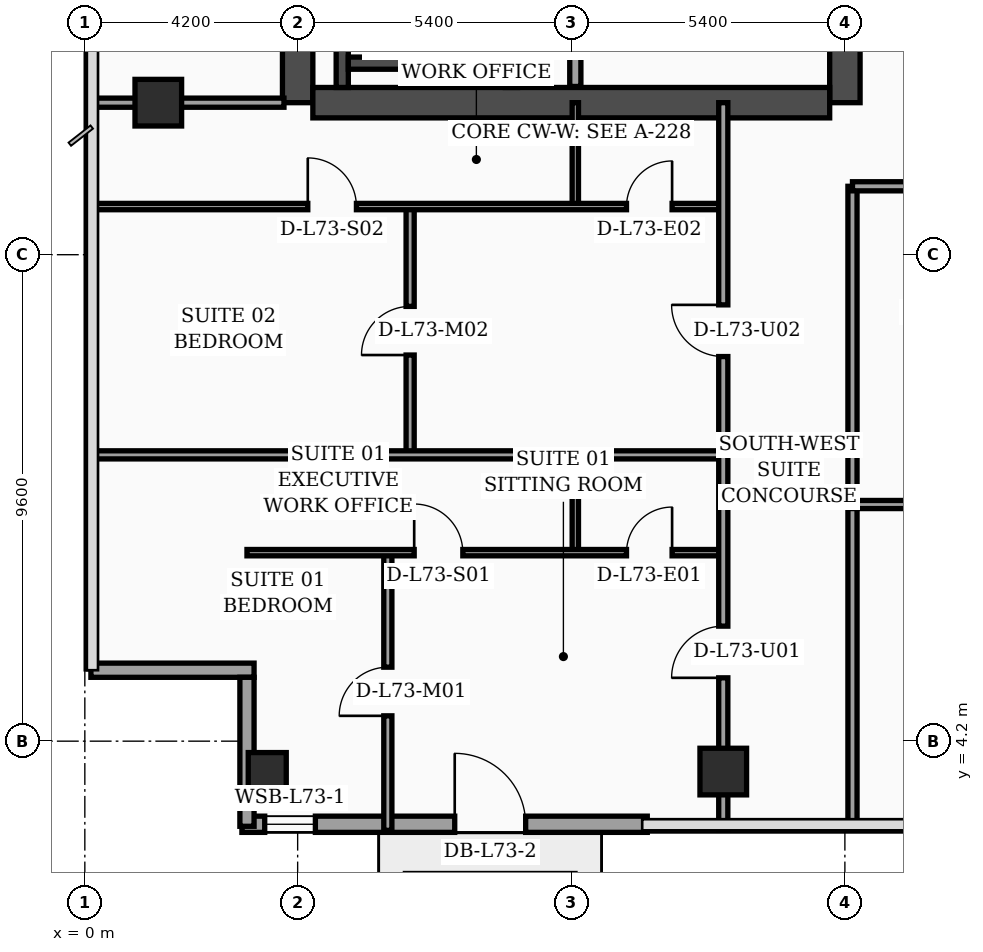
"""IFC4 building model, lengths in metres.
Left out: names, types, materials, properties, quantities, classifications, styles, units other than length and angle.
Written with IfcOpenShell. Run it as: python <this file> out.ifc"""

import sys

from ifc_helpers import new_model, si_unit, direction, frame, frame_2d, origin, origin_2d, place, context, subcontext, project, spatial, rectangle, hollow_rectangle, extrude, element, fill, save


model = new_model("IFC4")
c1 = context("Model", 3, precision=1e-05, world=origin(), true_north=direction((0.0, 1.0)))
c2 = subcontext(c1, "Body", "Model", "MODEL_VIEW")
j1 = project(units=[si_unit("LENGTHUNIT", "METRE"), si_unit("PLANEANGLEUNIT", "RADIAN")], contexts=[c1])
p1 = place(None, origin())
s1 = spatial("IfcSite", under=j1, at=p1, CompositionType="ELEMENT")
p2 = place(p1, origin())
s2 = spatial("IfcBuilding", under=s1, at=p2, CompositionType="ELEMENT")
p3 = place(p2, frame((0.0, 0.0, 294.9)))
s3 = spatial("IfcBuildingStorey", under=s2, at=p3, CompositionType="ELEMENT", Elevation=294.9)
p4 = place(p3, frame((4.2, 16.8, 0.0), z_axis=(0.0, 0.0, 1.0), x_axis=(0.0, 1.0, 0.0)))
e1 = element("IfcWall", 1, at=p4, inside=s3, PredefinedType="SHEAR", context=c2, shape_type="SweptSolid", body=[
    extrude(rectangle(XDim=21.6, YDim=0.6, at=frame_2d((10.8, 0.0))), origin(), (0.0, 0.0, 1.0), 3.56),
])
p5 = place(p3, frame((15.0, 16.8, 0.0), z_axis=(0.0, 0.0, 1.0), x_axis=(0.0, 1.0, 0.0)))
e2 = element("IfcWall", 2, at=p5, inside=s3, PredefinedType="SHEAR", context=c2, shape_type="SweptSolid", body=[
    extrude(rectangle(XDim=21.6, YDim=0.6, at=frame_2d((10.8, 0.0))), origin(), (0.0, 0.0, 1.0), 3.56),
])
p6 = place(p5, frame((8.65, 0.0, 0.0)))
e3 = element("IfcOpeningElement", 3, at=p6, cuts=e2, PredefinedType="OPENING", context=c2, shape_type="SweptSolid", body=[
    extrude(rectangle(XDim=1.1, YDim=2.2, at=frame_2d((0.55, 1.1))), frame((0.0, 0.31, 0.0), z_axis=(0.0, -1.0, 0.0), x_axis=(1.0, 0.0, 0.0)), (0.0, 0.0, 1.0), 0.62),
])
p7 = place(p5, frame((18.9, 0.0, 0.0)))
e4 = element("IfcOpeningElement", 4, at=p7, cuts=e2, PredefinedType="OPENING", context=c2, shape_type="SweptSolid", body=[
    extrude(rectangle(XDim=1.1, YDim=2.2, at=frame_2d((0.55, 1.1))), frame((0.0, 0.31, 0.0), z_axis=(0.0, -1.0, 0.0), x_axis=(1.0, 0.0, 0.0)), (0.0, 0.0, 1.0), 0.62),
])
p8 = place(p3, frame((4.5, 16.8, 0.0), z_axis=(0.0, 0.0, 1.0), x_axis=(1.0, 0.0, 0.0)))
e5 = element("IfcWall", 5, at=p8, inside=s3, PredefinedType="SHEAR", context=c2, shape_type="SweptSolid", body=[
    extrude(rectangle(XDim=10.2, YDim=0.6, at=frame_2d((5.1, 0.0))), origin(), (0.0, 0.0, 1.0), 3.56),
])
p9 = place(p3, frame((5.08, 17.1, 0.0), z_axis=(0.0, 0.0, 1.0), x_axis=(0.0, 1.0, 0.0)))
e6 = element("IfcWall", 6, at=p9, inside=s3, PredefinedType="SOLIDWALL", context=c2, shape_type="SweptSolid", body=[
    extrude(rectangle(XDim=9.69, YDim=0.24, at=frame_2d((4.845, 0.0))), origin(), (0.0, 0.0, 1.0), 3.56),
])
p10 = place(p3, frame((8.42, 17.1, 0.0), z_axis=(0.0, 0.0, 1.0), x_axis=(0.0, 1.0, 0.0)))
e7 = element("IfcWall", 7, at=p10, inside=s3, PredefinedType="SOLIDWALL", context=c2, shape_type="SweptSolid", body=[
    extrude(rectangle(XDim=9.69, YDim=0.24, at=frame_2d((4.845, 0.0))), origin(), (0.0, 0.0, 1.0), 3.56),
])
p11 = place(p10, frame((0.35, 0.0, 0.0)))
e8 = element("IfcOpeningElement", 8, at=p11, cuts=e7, PredefinedType="OPENING", context=c2, shape_type="SweptSolid", body=[
    extrude(rectangle(XDim=1.15, YDim=2.2, at=frame_2d((0.575, 1.1))), frame((0.0, 0.13, 0.0), z_axis=(0.0, -1.0, 0.0), x_axis=(1.0, 0.0, 0.0)), (0.0, 0.0, 1.0), 0.26),
])
p12 = place(p3, frame((5.2, 17.58, 0.0), z_axis=(0.0, 0.0, 1.0), x_axis=(1.0, 0.0, 0.0)))
e9 = element("IfcWall", 9, at=p12, inside=s3, PredefinedType="SOLIDWALL", context=c2, shape_type="SweptSolid", body=[
    extrude(rectangle(XDim=3.1, YDim=0.24, at=frame_2d((1.55, 0.0))), origin(), (0.0, 0.0, 1.0), 3.56),
])
p13 = place(p3, frame((3.6, 3.6, 0.0), z_axis=(0.0, 0.0, 1.0), x_axis=(1.0, 0.0, 0.0)))
e10 = element("IfcColumn", 10, at=p13, inside=s3, PredefinedType="COLUMN", context=c2, shape_type="SweptSolid", body=[
    extrude(hollow_rectangle(XDim=0.75, YDim=0.75, WallThickness=0.032, at=origin_2d()), origin(), (0.0, 0.0, 1.0), 3.56),
])
for number, where, z_axis, x_axis in (
    (11, (1.45, 16.8, 0.0), (0.0, 0.0, 1.0), (1.0, 0.0, 0.0)),
    (12, (12.6, 3.6, 0.0), (0.0, 0.0, 1.0), (1.0, 0.0, 0.0)),
):
    element("IfcColumn", number, at=place(p3, frame(where, z_axis=z_axis, x_axis=x_axis)), inside=s3, PredefinedType="COLUMN", context=c2, shape_type="SweptSolid", body=[
        extrude(rectangle(XDim=0.92, YDim=0.92, at=origin_2d()), origin(), (0.0, 0.0, 1.0), 3.56),
    ])
p14 = place(p3, frame((3.1, 2.56, 0.0), z_axis=(0.0, 0.0, 1.0), x_axis=(1.0, 0.0, 0.0)))
e13 = element("IfcWall", 13, at=p14, inside=s3, PredefinedType="SOLIDWALL", context=c2, shape_type="SweptSolid", body=[
    extrude(rectangle(XDim=8.0, YDim=0.32, at=frame_2d((4.0, 0.0))), origin(), (0.0, 0.0, 1.0), 3.56),
])
p15 = place(p14, frame((0.45, 0.0, 0.75)))
e14 = element("IfcOpeningElement", 14, at=p15, cuts=e13, PredefinedType="OPENING", context=c2, shape_type="SweptSolid", body=[
    extrude(rectangle(XDim=1.0, YDim=1.6, at=frame_2d((0.5, 0.8))), frame((0.0, 0.17, 0.0), z_axis=(0.0, -1.0, 0.0), x_axis=(1.0, 0.0, 0.0)), (0.0, 0.0, 1.0), 0.34),
])
p16 = place(p14, frame((4.2, 0.0, 0.0)))
e15 = element("IfcOpeningElement", 15, at=p16, cuts=e13, PredefinedType="OPENING", context=c2, shape_type="SweptSolid", body=[
    extrude(rectangle(XDim=1.4, YDim=2.25, at=frame_2d((0.7, 1.125))), frame((0.0, 0.17, 0.0), z_axis=(0.0, -1.0, 0.0), x_axis=(1.0, 0.0, 0.0)), (0.0, 0.0, 1.0), 0.34),
])
p17 = place(p3, frame((0.12, 5.6, 0.0), z_axis=(0.0, 0.0, 1.0), x_axis=(1.0, 0.0, 0.0)))
e16 = element("IfcWall", 16, at=p17, inside=s3, PredefinedType="SOLIDWALL", context=c2, shape_type="SweptSolid", body=[
    extrude(rectangle(XDim=3.22, YDim=0.28, at=frame_2d((1.61, 0.0))), origin(), (0.0, 0.0, 1.0), 2.99),
])
p18 = place(p3, frame((3.2, 5.46, 0.0), z_axis=(0.0, 0.0, 1.0), x_axis=(0.0, -1.0, 0.0)))
e17 = element("IfcWall", 17, at=p18, inside=s3, PredefinedType="SOLIDWALL", context=c2, shape_type="SweptSolid", body=[
    extrude(rectangle(XDim=2.94, YDim=0.28, at=frame_2d((1.47, 0.0))), origin(), (0.0, 0.0, 1.0), 2.99),
])
p19 = place(p3, frame((9.68, 17.12, 0.0), z_axis=(0.0, 0.0, 1.0), x_axis=(0.0, 1.0, 0.0)))
e18 = element("IfcWall", 18, at=p19, inside=s3, PredefinedType="SOLIDWALL", context=c2, shape_type="SweptSolid", body=[
    extrude(rectangle(XDim=7.88, YDim=0.22, at=frame_2d((3.94, 0.0))), origin(), (0.0, 0.0, 1.0), 3.56),
])
p20 = place(p3, frame((0.08, 16.8, 0.0), z_axis=(0.0, 0.0, 1.0), x_axis=(1.0, 0.0, 0.0)))
e19 = element("IfcWall", 19, at=p20, inside=s3, PredefinedType="PARTITIONING", context=c2, shape_type="SweptSolid", body=[
    extrude(rectangle(XDim=3.85, YDim=0.18, at=frame_2d((1.925, 0.0))), origin(), (0.0, 0.0, 1.0), 2.99),
])
p21 = place(p3, frame((9.68, 7.92, 0.0), z_axis=(0.0, 0.0, 1.0), x_axis=(0.0, 1.0, 0.0)))
e20 = element("IfcWall", 20, at=p21, inside=s3, PredefinedType="PARTITIONING", context=c2, shape_type="SweptSolid", body=[
    extrude(rectangle(XDim=1.93, YDim=0.125, at=frame_2d((0.965, 0.0))), origin(), (0.0, 0.0, 1.0), 3.09),
])
p22 = place(p3, frame((5.98, 2.44, 0.0), z_axis=(0.0, 0.0, 1.0), x_axis=(0.0, 1.0, 0.0)))
e21 = element("IfcWall", 21, at=p22, inside=s3, PredefinedType="PARTITIONING", context=c2, shape_type="SweptSolid", body=[
    extrude(rectangle(XDim=5.48, YDim=0.16, at=frame_2d((2.74, 0.0))), origin(), (0.0, 0.0, 1.0), 3.09),
])
p23 = place(p22, frame((2.26, 0.0, 0.0)))
e22 = element("IfcOpeningElement", 22, at=p23, cuts=e21, PredefinedType="OPENING", context=c2, shape_type="SweptSolid", body=[
    extrude(rectangle(XDim=0.96, YDim=2.2, at=frame_2d((0.48, 1.1))), frame((0.0, 0.09, 0.0), z_axis=(0.0, -1.0, 0.0), x_axis=(1.0, 0.0, 0.0)), (0.0, 0.0, 1.0), 0.18),
])
p24 = place(p3, frame((3.2, 7.92, 0.0), z_axis=(0.0, 0.0, 1.0), x_axis=(1.0, 0.0, 0.0)))
e23 = element("IfcWall", 23, at=p24, inside=s3, PredefinedType="PARTITIONING", context=c2, shape_type="SweptSolid", body=[
    extrude(rectangle(XDim=9.4, YDim=0.125, at=frame_2d((4.7, 0.0))), origin(), (0.0, 0.0, 1.0), 2.99),
])
p25 = place(p24, frame((3.3, 0.0, 0.0)))
e24 = element("IfcOpeningElement", 24, at=p25, cuts=e23, PredefinedType="OPENING", context=c2, shape_type="SweptSolid", body=[
    extrude(rectangle(XDim=0.96, YDim=2.2, at=frame_2d((0.48, 1.1))), frame((0.0, 0.073, 0.0), z_axis=(0.0, -1.0, 0.0), x_axis=(1.0, 0.0, 0.0)), (0.0, 0.0, 1.0), 0.145),
])
p26 = place(p24, frame((7.49, 0.0, 0.0)))
e25 = element("IfcOpeningElement", 25, at=p26, cuts=e23, PredefinedType="OPENING", context=c2, shape_type="SweptSolid", body=[
    extrude(rectangle(XDim=0.9, YDim=2.15, at=frame_2d((0.45, 1.075))), frame((0.0, 0.073, 0.0), z_axis=(0.0, -1.0, 0.0), x_axis=(1.0, 0.0, 0.0)), (0.0, 0.0, 1.0), 0.145),
])
p27 = place(p3, frame((9.68, 14.75, 0.0), z_axis=(0.0, 0.0, 1.0), x_axis=(0.0, 1.0, 0.0)))
e26 = element("IfcWall", 26, at=p27, inside=s3, PredefinedType="PARTITIONING", context=c2, shape_type="SweptSolid", body=[
    extrude(rectangle(XDim=2.05, YDim=0.125, at=frame_2d((1.025, 0.0))), origin(), (0.0, 0.0, 1.0), 3.56),
])
p28 = place(p3, frame((6.42, 9.85, 0.0), z_axis=(0.0, 0.0, 1.0), x_axis=(0.0, 1.0, 0.0)))
e27 = element("IfcWall", 27, at=p28, inside=s3, PredefinedType="PARTITIONING", context=c2, shape_type="SweptSolid", body=[
    extrude(rectangle(XDim=4.9, YDim=0.16, at=frame_2d((2.45, 0.0))), origin(), (0.0, 0.0, 1.0), 3.14),
])
p29 = place(p28, frame((1.97, 0.0, 0.0)))
e28 = element("IfcOpeningElement", 28, at=p29, cuts=e27, PredefinedType="OPENING", context=c2, shape_type="SweptSolid", body=[
    extrude(rectangle(XDim=0.96, YDim=2.2, at=frame_2d((0.48, 1.1))), frame((0.0, 0.09, 0.0), z_axis=(0.0, -1.0, 0.0), x_axis=(1.0, 0.0, 0.0)), (0.0, 0.0, 1.0), 0.18),
])
p30 = place(p3, frame((0.08, 14.75, 0.0), z_axis=(0.0, 0.0, 1.0), x_axis=(1.0, 0.0, 0.0)))
e29 = element("IfcWall", 29, at=p30, inside=s3, PredefinedType="PARTITIONING", context=c2, shape_type="SweptSolid", body=[
    extrude(rectangle(XDim=12.52, YDim=0.125, at=frame_2d((6.26, 0.0))), origin(), (0.0, 0.0, 1.0), 2.99),
])
p31 = place(p30, frame((4.32, 0.0, 0.0)))
e30 = element("IfcOpeningElement", 30, at=p31, cuts=e29, PredefinedType="OPENING", context=c2, shape_type="SweptSolid", body=[
    extrude(rectangle(XDim=0.96, YDim=2.2, at=frame_2d((0.48, 1.1))), frame((0.0, 0.073, 0.0), z_axis=(0.0, -1.0, 0.0), x_axis=(1.0, 0.0, 0.0)), (0.0, 0.0, 1.0), 0.145),
])
p32 = place(p30, frame((10.61, 0.0, 0.0)))
e31 = element("IfcOpeningElement", 31, at=p32, cuts=e29, PredefinedType="OPENING", context=c2, shape_type="SweptSolid", body=[
    extrude(rectangle(XDim=0.9, YDim=2.15, at=frame_2d((0.45, 1.075))), frame((0.0, 0.073, 0.0), z_axis=(0.0, -1.0, 0.0), x_axis=(1.0, 0.0, 0.0)), (0.0, 0.0, 1.0), 0.145),
])
p33 = place(p3, frame((0.08, 9.85, 0.0), z_axis=(0.0, 0.0, 1.0), x_axis=(1.0, 0.0, 0.0)))
e32 = element("IfcWall", 32, at=p33, inside=s3, PredefinedType="PARTITIONING", context=c2, shape_type="SweptSolid", body=[
    extrude(rectangle(XDim=12.52, YDim=0.16, at=frame_2d((6.26, 0.0))), origin(), (0.0, 0.0, 1.0), 2.99),
])
p34 = place(p3, frame((12.6, 2.44, 0.0), z_axis=(0.0, 0.0, 1.0), x_axis=(0.0, 1.0, 0.0)))
e33 = element("IfcWall", 33, at=p34, inside=s3, PredefinedType="PARTITIONING", context=c2, shape_type="SweptSolid", body=[
    extrude(rectangle(XDim=14.36, YDim=0.18, at=frame_2d((7.18, 0.0))), origin(), (0.0, 0.0, 1.0), 2.99),
])
p35 = place(p34, frame((3.01, 0.0, 0.0)))
e34 = element("IfcOpeningElement", 34, at=p35, cuts=e33, PredefinedType="OPENING", context=c2, shape_type="SweptSolid", body=[
    extrude(rectangle(XDim=1.02, YDim=2.2, at=frame_2d((0.51, 1.1))), frame((0.0, 0.1, 0.0), z_axis=(0.0, -1.0, 0.0), x_axis=(1.0, 0.0, 0.0)), (0.0, 0.0, 1.0), 0.2),
])
p36 = place(p34, frame((9.35, 0.0, 0.0)))
e35 = element("IfcOpeningElement", 35, at=p36, cuts=e33, PredefinedType="OPENING", context=c2, shape_type="SweptSolid", body=[
    extrude(rectangle(XDim=1.02, YDim=2.2, at=frame_2d((0.51, 1.1))), frame((0.0, 0.1, 0.0), z_axis=(0.0, -1.0, 0.0), x_axis=(1.0, 0.0, 0.0)), (0.0, 0.0, 1.0), 0.2),
])
p37 = place(p3, frame((15.15, 2.44, 0.0), z_axis=(0.0, 0.0, 1.0), x_axis=(0.0, 1.0, 0.0)))
e36 = element("IfcWall", 36, at=p37, inside=s3, PredefinedType="PARTITIONING", context=c2, shape_type="SweptSolid", body=[
    extrude(rectangle(XDim=12.71, YDim=0.18, at=frame_2d((6.355, 0.0))), origin(), (0.0, 0.0, 1.0), 3.09),
])
p38 = place(p3, frame((15.15, 8.87, 0.0), z_axis=(0.0, 0.0, 1.0), x_axis=(1.0, 0.0, 0.0)))
e37 = element("IfcWall", 37, at=p38, inside=s3, PredefinedType="PARTITIONING", context=c2, shape_type="SweptSolid", body=[
    extrude(rectangle(XDim=4.45, YDim=0.16, at=frame_2d((2.225, 0.0))), origin(), (0.0, 0.0, 1.0), 3.56),
])
p39 = place(p38, frame((1.75, 0.0, 0.0)))
e38 = element("IfcOpeningElement", 38, at=p39, cuts=e37, PredefinedType="OPENING", context=c2, shape_type="SweptSolid", body=[
    extrude(rectangle(XDim=0.96, YDim=2.2, at=frame_2d((0.48, 1.1))), frame((0.0, 0.09, 0.0), z_axis=(0.0, -1.0, 0.0), x_axis=(1.0, 0.0, 0.0)), (0.0, 0.0, 1.0), 0.18),
])
p40 = place(p3, frame((15.15, 15.15, 0.0), z_axis=(0.0, 0.0, 1.0), x_axis=(1.0, 0.0, 0.0)))
e39 = element("IfcWall", 39, at=p40, inside=s3, PredefinedType="PARTITIONING", context=c2, shape_type="SweptSolid", body=[
    extrude(rectangle(XDim=6.45, YDim=0.18, at=frame_2d((3.225, 0.0))), origin(), (0.0, 0.0, 1.0), 2.59),
])
p41 = place(p40, frame((1.74, 0.0, 0.0)))
e40 = element("IfcOpeningElement", 40, at=p41, cuts=e39, PredefinedType="OPENING", context=c2, shape_type="SweptSolid", body=[
    extrude(rectangle(XDim=1.02, YDim=2.2, at=frame_2d((0.51, 1.1))), frame((0.0, 0.1, 0.0), z_axis=(0.0, -1.0, 0.0), x_axis=(1.0, 0.0, 0.0)), (0.0, 0.0, 1.0), 0.2),
])
p42 = place(p15, origin())
e41 = element("IfcWindow", 41, at=p42, inside=s3, PartitioningType="SINGLE_PANEL", PredefinedType="WINDOW", context=c2, shape_type="SweptSolid", body=[
    extrude(rectangle(XDim=1.0, YDim=1.6, at=frame_2d((0.5, 0.8))), frame((0.0, 0.03, 0.0), z_axis=(0.0, -1.0, 0.0), x_axis=(1.0, 0.0, 0.0)), (0.0, 0.0, 1.0), 0.06),
])
fill(e14, e41)
p43 = place(p16, origin())
e42 = element("IfcDoor", 42, at=p43, inside=s3, OperationType="SINGLE_SWING_LEFT", PredefinedType="DOOR", context=c2, shape_type="SweptSolid", body=[
    extrude(rectangle(XDim=1.4, YDim=2.25, at=frame_2d((0.7, 1.125))), frame((0.0, 0.025, 0.0), z_axis=(0.0, -1.0, 0.0), x_axis=(1.0, 0.0, 0.0)), (0.0, 0.0, 1.0), 0.05),
])
fill(e15, e42)
p44 = place(p23, origin())
e43 = element("IfcDoor", 43, at=p44, inside=s3, OperationType="SINGLE_SWING_LEFT", PredefinedType="DOOR", context=c2, shape_type="SweptSolid", body=[
    extrude(rectangle(XDim=0.96, YDim=2.2, at=frame_2d((0.48, 1.1))), frame((0.0, 0.025, 0.0), z_axis=(0.0, -1.0, 0.0), x_axis=(1.0, 0.0, 0.0)), (0.0, 0.0, 1.0), 0.05),
])
fill(e22, e43)
p45 = place(p25, origin())
e44 = element("IfcDoor", 44, at=p45, inside=s3, OperationType="SINGLE_SWING_LEFT", PredefinedType="DOOR", context=c2, shape_type="SweptSolid", body=[
    extrude(rectangle(XDim=0.96, YDim=2.2, at=frame_2d((0.48, 1.1))), frame((0.0, 0.025, 0.0), z_axis=(0.0, -1.0, 0.0), x_axis=(1.0, 0.0, 0.0)), (0.0, 0.0, 1.0), 0.05),
])
fill(e24, e44)
p46 = place(p26, origin())
e45 = element("IfcDoor", 45, at=p46, inside=s3, OperationType="SINGLE_SWING_RIGHT", PredefinedType="DOOR", context=c2, shape_type="SweptSolid", body=[
    extrude(rectangle(XDim=0.9, YDim=2.15, at=frame_2d((0.45, 1.075))), frame((0.0, 0.025, 0.0), z_axis=(0.0, -1.0, 0.0), x_axis=(1.0, 0.0, 0.0)), (0.0, 0.0, 1.0), 0.05),
])
fill(e25, e45)
p47 = place(p29, origin())
e46 = element("IfcDoor", 46, at=p47, inside=s3, OperationType="SINGLE_SWING_LEFT", PredefinedType="DOOR", context=c2, shape_type="SweptSolid", body=[
    extrude(rectangle(XDim=0.96, YDim=2.2, at=frame_2d((0.48, 1.1))), frame((0.0, 0.025, 0.0), z_axis=(0.0, -1.0, 0.0), x_axis=(1.0, 0.0, 0.0)), (0.0, 0.0, 1.0), 0.05),
])
fill(e28, e46)
p48 = place(p31, origin())
e47 = element("IfcDoor", 47, at=p48, inside=s3, OperationType="SINGLE_SWING_LEFT", PredefinedType="DOOR", context=c2, shape_type="SweptSolid", body=[
    extrude(rectangle(XDim=0.96, YDim=2.2, at=frame_2d((0.48, 1.1))), frame((0.0, 0.025, 0.0), z_axis=(0.0, -1.0, 0.0), x_axis=(1.0, 0.0, 0.0)), (0.0, 0.0, 1.0), 0.05),
])
fill(e30, e47)
p49 = place(p32, origin())
e48 = element("IfcDoor", 48, at=p49, inside=s3, OperationType="SINGLE_SWING_RIGHT", PredefinedType="DOOR", context=c2, shape_type="SweptSolid", body=[
    extrude(rectangle(XDim=0.9, YDim=2.15, at=frame_2d((0.45, 1.075))), frame((0.0, 0.025, 0.0), z_axis=(0.0, -1.0, 0.0), x_axis=(1.0, 0.0, 0.0)), (0.0, 0.0, 1.0), 0.05),
])
fill(e31, e48)
p50 = place(p35, origin())
e49 = element("IfcDoor", 49, at=p50, inside=s3, OperationType="SINGLE_SWING_LEFT", PredefinedType="DOOR", context=c2, shape_type="SweptSolid", body=[
    extrude(rectangle(XDim=1.02, YDim=2.2, at=frame_2d((0.51, 1.1))), frame((0.0, 0.025, 0.0), z_axis=(0.0, -1.0, 0.0), x_axis=(1.0, 0.0, 0.0)), (0.0, 0.0, 1.0), 0.05),
])
fill(e34, e49)
p51 = place(p36, origin())
e50 = element("IfcDoor", 50, at=p51, inside=s3, OperationType="SINGLE_SWING_RIGHT", PredefinedType="DOOR", context=c2, shape_type="SweptSolid", body=[
    extrude(rectangle(XDim=1.02, YDim=2.2, at=frame_2d((0.51, 1.1))), frame((0.0, 0.025, 0.0), z_axis=(0.0, -1.0, 0.0), x_axis=(1.0, 0.0, 0.0)), (0.0, 0.0, 1.0), 0.05),
])
fill(e35, e50)
p52 = place(p11, origin())
e51 = element("IfcDoor", 51, at=p52, inside=s3, OperationType="SINGLE_SWING_LEFT", PredefinedType="DOOR", context=c2, shape_type="SweptSolid", body=[
    extrude(rectangle(XDim=1.15, YDim=2.2, at=frame_2d((0.575, 1.1))), frame((0.0, 0.025, 0.0), z_axis=(0.0, -1.0, 0.0), x_axis=(1.0, 0.0, 0.0)), (0.0, 0.0, 1.0), 0.05),
])
fill(e8, e51)
save(model, sys.argv[1])
